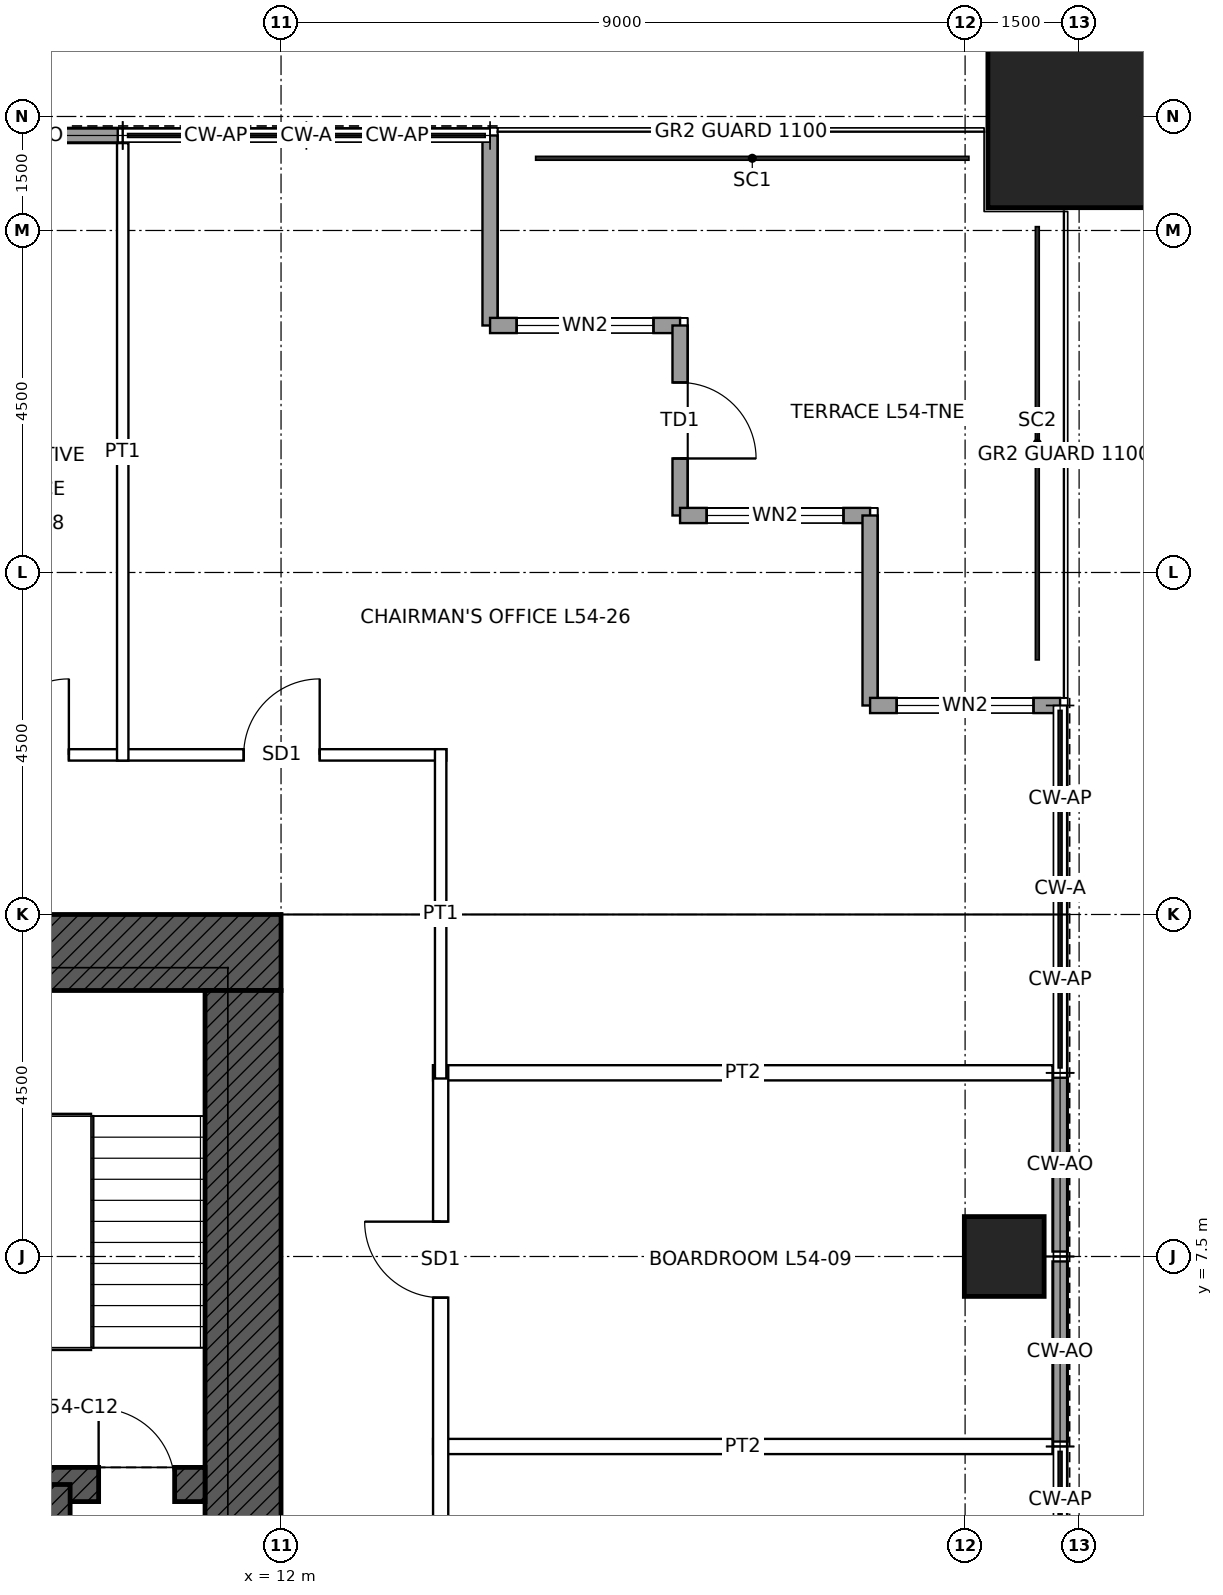
"""IFC4 building model, lengths in metres.
Left out: names, types, materials, properties, quantities, classifications, styles, units other than length and angle.
Written with IfcOpenShell. Run it as: python <this file> out.ifc"""

import sys

from ifc_helpers import new_model, si_unit, direction, frame, frame_2d, origin, origin_2d, place, context, subcontext, project, spatial, rectangle, hollow_rectangle, extrude, element, fill, save


model = new_model("IFC4")
c1 = context("Model", 3, precision=1e-05, world=origin(), true_north=direction((0.0, 1.0)))
c2 = subcontext(c1, "Body", "Model", "MODEL_VIEW")
j1 = project(units=[si_unit("LENGTHUNIT", "METRE"), si_unit("PLANEANGLEUNIT", "RADIAN")], contexts=[c1])
p1 = place(None, origin())
s1 = spatial("IfcSite", under=j1, at=p1, CompositionType="ELEMENT")
p2 = place(p1, origin())
s2 = spatial("IfcBuilding", under=s1, at=p2, CompositionType="ELEMENT")
p3 = place(p2, frame((0.0, 0.0, 249.9)))
s3 = spatial("IfcBuildingStorey", under=s2, at=p3, CompositionType="ELEMENT", Elevation=249.9)
p4 = place(p3, frame((22.5, 22.5, 0.0), z_axis=(0.0, 0.0, 1.0), x_axis=(1.0, 0.0, 0.0)))
e1 = element("IfcColumn", 1, at=p4, inside=s3, PredefinedType="COLUMN", context=c2, shape_type="SweptSolid", body=[
    extrude(hollow_rectangle(XDim=2.4, YDim=2.4, WallThickness=0.12, at=origin_2d()), origin(), (0.0, 0.0, 1.0), 4.0),
])
p5 = place(p3, frame((21.515, 7.5, 0.0), z_axis=(0.0, 0.0, 1.0), x_axis=(1.0, 0.0, 0.0)))
e2 = element("IfcColumn", 2, at=p5, inside=s3, PredefinedType="COLUMN", context=c2, shape_type="SweptSolid", body=[
    extrude(hollow_rectangle(XDim=1.05, YDim=1.05, WallThickness=0.07, at=origin_2d()), origin(), (0.0, 0.0, 1.0), 4.0),
])
p6 = place(p3, frame((-12.0, 11.5, 0.0), z_axis=(0.0, 0.0, 1.0), x_axis=(1.0, 0.0, 0.0)))
e3 = element("IfcWall", 3, at=p6, inside=s3, PredefinedType="SHEAR", context=c2, shape_type="SweptSolid", body=[
    extrude(rectangle(XDim=24.0, YDim=1.0, at=frame_2d((12.0, 0.0))), origin(), (0.0, 0.0, 1.0), 4.0),
])
p7 = place(p6, frame((6.25, 0.0, 0.0)))
e4 = element("IfcOpeningElement", 4, at=p7, cuts=e3, PredefinedType="OPENING", context=c2, shape_type="SweptSolid", body=[
    extrude(rectangle(XDim=1.0, YDim=2.4, at=frame_2d((0.5, 1.2))), frame((0.0, 0.51, 0.0), z_axis=(0.0, -1.0, 0.0), x_axis=(1.0, 0.0, 0.0)), (0.0, 0.0, 1.0), 1.02),
])
p8 = place(p6, frame((16.75, 0.0, 0.0)))
e5 = element("IfcOpeningElement", 5, at=p8, cuts=e3, PredefinedType="OPENING", context=c2, shape_type="SweptSolid", body=[
    extrude(rectangle(XDim=1.0, YDim=2.4, at=frame_2d((0.5, 1.2))), frame((0.0, 0.51, 0.0), z_axis=(0.0, -1.0, 0.0), x_axis=(1.0, 0.0, 0.0)), (0.0, 0.0, 1.0), 1.02),
])
p9 = place(p3, frame((11.5, 11.0, 0.0), z_axis=(0.0, 0.0, 1.0), x_axis=(0.0, -1.0, 0.0)))
e6 = element("IfcWall", 6, at=p9, inside=s3, PredefinedType="SHEAR", context=c2, shape_type="SweptSolid", body=[
    extrude(rectangle(XDim=22.0, YDim=1.0, at=frame_2d((11.0, 0.0))), origin(), (0.0, 0.0, 1.0), 4.0),
])
p10 = place(p9, frame((10.5, 0.0, 0.0)))
e7 = element("IfcOpeningElement", 7, at=p10, cuts=e6, PredefinedType="OPENING", context=c2, shape_type="SweptSolid", body=[
    extrude(rectangle(XDim=1.0, YDim=2.4, at=frame_2d((0.5, 1.2))), frame((0.0, 0.51, 0.0), z_axis=(0.0, -1.0, 0.0), x_axis=(1.0, 0.0, 0.0)), (0.0, 0.0, 1.0), 1.02),
])
p11 = place(p3, frame((-11.0, 4.5, 0.0), z_axis=(0.0, 0.0, 1.0), x_axis=(1.0, 0.0, 0.0)))
e8 = element("IfcWall", 8, at=p11, inside=s3, PredefinedType="SHEAR", context=c2, shape_type="SweptSolid", body=[
    extrude(rectangle(XDim=22.0, YDim=0.45, at=frame_2d((11.0, 0.0))), origin(), (0.0, 0.0, 1.0), 4.0),
])
p12 = place(p11, frame((0.4, 0.0, 0.0)))
e9 = element("IfcOpeningElement", 9, at=p12, cuts=e8, PredefinedType="OPENING", context=c2, shape_type="SweptSolid", body=[
    extrude(rectangle(XDim=1.0, YDim=2.1, at=frame_2d((0.5, 1.05))), frame((0.0, 0.235, 0.0), z_axis=(0.0, -1.0, 0.0), x_axis=(1.0, 0.0, 0.0)), (0.0, 0.0, 1.0), 0.47),
])
p13 = place(p11, frame((20.6, 0.0, 0.0)))
e10 = element("IfcOpeningElement", 10, at=p13, cuts=e8, PredefinedType="OPENING", context=c2, shape_type="SweptSolid", body=[
    extrude(rectangle(XDim=1.0, YDim=2.1, at=frame_2d((0.5, 1.05))), frame((0.0, 0.235, 0.0), z_axis=(0.0, -1.0, 0.0), x_axis=(1.0, 0.0, 0.0)), (0.0, 0.0, 1.0), 0.47),
])
p14 = place(p3, frame((9.0, 1.5, 0.0), z_axis=(0.0, 0.0, 1.0), x_axis=(0.0, 1.0, 0.0)))
e11 = element("IfcWall", 11, at=p14, inside=s3, PredefinedType="SHEAR", context=c2, shape_type="SweptSolid", body=[
    extrude(rectangle(XDim=3.0, YDim=0.45, at=frame_2d((1.5, 0.0))), origin(), (0.0, 0.0, 1.0), 4.0),
])
p15 = place(p3, frame((14.75, 22.25, 0.0), z_axis=(0.0, 0.0, 1.0), x_axis=(0.0, -1.0, 0.0)))
e12 = element("IfcWall", 12, at=p15, inside=s3, PredefinedType="SOLIDWALL", context=c2, shape_type="SweptSolid", body=[
    extrude(rectangle(XDim=2.5, YDim=0.2, at=frame_2d((1.25, 0.0))), origin(), (0.0, 0.0, 1.0), 3.75),
])
p16 = place(p3, frame((14.75, 19.75, 0.0), z_axis=(0.0, 0.0, 1.0), x_axis=(1.0, 0.0, 0.0)))
e13 = element("IfcWall", 13, at=p16, inside=s3, PredefinedType="SOLIDWALL", context=c2, shape_type="SweptSolid", body=[
    extrude(rectangle(XDim=2.5, YDim=0.2, at=frame_2d((1.25, 0.0))), origin(), (0.0, 0.0, 1.0), 3.75),
])
p17 = place(p16, frame((0.35, 0.0, 0.3)))
e14 = element("IfcOpeningElement", 14, at=p17, cuts=e13, PredefinedType="OPENING", context=c2, shape_type="SweptSolid", body=[
    extrude(rectangle(XDim=1.8, YDim=2.4, at=frame_2d((0.9, 1.2))), frame((0.0, 0.11, 0.0), z_axis=(0.0, -1.0, 0.0), x_axis=(1.0, 0.0, 0.0)), (0.0, 0.0, 1.0), 0.22),
])
p18 = place(p3, frame((17.25, 19.75, 0.0), z_axis=(0.0, 0.0, 1.0), x_axis=(0.0, -1.0, 0.0)))
e15 = element("IfcWall", 15, at=p18, inside=s3, PredefinedType="SOLIDWALL", context=c2, shape_type="SweptSolid", body=[
    extrude(rectangle(XDim=2.5, YDim=0.2, at=frame_2d((1.25, 0.0))), origin(), (0.0, 0.0, 1.0), 3.75),
])
p19 = place(p18, frame((0.75, 0.0, 0.0)))
e16 = element("IfcOpeningElement", 16, at=p19, cuts=e15, PredefinedType="OPENING", context=c2, shape_type="SweptSolid", body=[
    extrude(rectangle(XDim=1.0, YDim=2.4, at=frame_2d((0.5, 1.2))), frame((0.0, 0.11, 0.0), z_axis=(0.0, -1.0, 0.0), x_axis=(1.0, 0.0, 0.0)), (0.0, 0.0, 1.0), 0.22),
])
p20 = place(p3, frame((17.25, 17.25, 0.0), z_axis=(0.0, 0.0, 1.0), x_axis=(1.0, 0.0, 0.0)))
e17 = element("IfcWall", 17, at=p20, inside=s3, PredefinedType="SOLIDWALL", context=c2, shape_type="SweptSolid", body=[
    extrude(rectangle(XDim=2.5, YDim=0.2, at=frame_2d((1.25, 0.0))), origin(), (0.0, 0.0, 1.0), 3.75),
])
p21 = place(p20, frame((0.35, 0.0, 0.3)))
e18 = element("IfcOpeningElement", 18, at=p21, cuts=e17, PredefinedType="OPENING", context=c2, shape_type="SweptSolid", body=[
    extrude(rectangle(XDim=1.8, YDim=2.4, at=frame_2d((0.9, 1.2))), frame((0.0, 0.11, 0.0), z_axis=(0.0, -1.0, 0.0), x_axis=(1.0, 0.0, 0.0)), (0.0, 0.0, 1.0), 0.22),
])
p22 = place(p3, frame((19.75, 17.25, 0.0), z_axis=(0.0, 0.0, 1.0), x_axis=(0.0, -1.0, 0.0)))
e19 = element("IfcWall", 19, at=p22, inside=s3, PredefinedType="SOLIDWALL", context=c2, shape_type="SweptSolid", body=[
    extrude(rectangle(XDim=2.5, YDim=0.2, at=frame_2d((1.25, 0.0))), origin(), (0.0, 0.0, 1.0), 3.75),
])
p23 = place(p3, frame((19.75, 14.75, 0.0), z_axis=(0.0, 0.0, 1.0), x_axis=(1.0, 0.0, 0.0)))
e20 = element("IfcWall", 20, at=p23, inside=s3, PredefinedType="SOLIDWALL", context=c2, shape_type="SweptSolid", body=[
    extrude(rectangle(XDim=2.5, YDim=0.2, at=frame_2d((1.25, 0.0))), origin(), (0.0, 0.0, 1.0), 3.75),
])
p24 = place(p23, frame((0.35, 0.0, 0.3)))
e21 = element("IfcOpeningElement", 21, at=p24, cuts=e20, PredefinedType="OPENING", context=c2, shape_type="SweptSolid", body=[
    extrude(rectangle(XDim=1.8, YDim=2.4, at=frame_2d((0.9, 1.2))), frame((0.0, 0.11, 0.0), z_axis=(0.0, -1.0, 0.0), x_axis=(1.0, 0.0, 0.0)), (0.0, 0.0, 1.0), 0.22),
])
for number, where, z_axis, x_axis in (
    (22, (7.565, 22.25, 0.0), (0.0, 0.0, 1.0), (1.0, 0.0, 0.0)),
    (23, (22.25, 9.852, 0.0), (0.0, 0.0, 1.0), (0.0, -1.0, 0.0)),
):
    element("IfcWall", number, at=place(p3, frame(where, z_axis=z_axis, x_axis=x_axis)), inside=s3, PredefinedType="SOLIDWALL", context=c2, shape_type="SweptSolid", body=[
        extrude(rectangle(XDim=2.287, YDim=0.2, at=frame_2d((1.144, 0.0))), origin(), (0.0, 0.0, 1.0), 3.75),
    ])
p25 = place(p3, frame((22.25, 7.435, 0.0), z_axis=(0.0, 0.0, 1.0), x_axis=(0.0, -1.0, 0.0)))
e24 = element("IfcWall", 24, at=p25, inside=s3, PredefinedType="SOLIDWALL", context=c2, shape_type="SweptSolid", body=[
    extrude(rectangle(XDim=2.37, YDim=0.2, at=frame_2d((1.185, 0.0))), origin(), (0.0, 0.0, 1.0), 3.75),
])
for number, where, z_axis, x_axis in (
    (25, (14.0, 5.0, 0.0), (0.0, 0.0, 1.0), (1.0, 0.0, 0.0)),
    (26, (14.0, 9.917, 0.0), (0.0, 0.0, 1.0), (1.0, 0.0, 0.0)),
):
    element("IfcWall", number, at=place(p3, frame(where, z_axis=z_axis, x_axis=x_axis)), inside=s3, PredefinedType="PARTITIONING", context=c2, shape_type="SweptSolid", body=[
        extrude(rectangle(XDim=8.15, YDim=0.2, at=frame_2d((4.075, 0.0))), origin(), (0.0, 0.0, 1.0), 3.75),
    ])
p26 = place(p3, frame((-14.175, 14.1, 0.0), z_axis=(0.0, 0.0, 1.0), x_axis=(1.0, 0.0, 0.0)))
e27 = element("IfcWall", 27, at=p26, inside=s3, PredefinedType="PARTITIONING", context=c2, shape_type="SweptSolid", body=[
    extrude(rectangle(XDim=28.35, YDim=0.15, at=frame_2d((14.175, 0.0))), origin(), (0.0, 0.0, 1.0), 3.75),
])
p27 = place(p26, frame((4.967, 0.0, 0.0)))
e28 = element("IfcOpeningElement", 28, at=p27, cuts=e27, PredefinedType="OPENING", context=c2, shape_type="SweptSolid", body=[
    extrude(rectangle(XDim=1.0, YDim=2.4, at=frame_2d((0.5, 1.2))), frame((0.0, 0.085, 0.0), z_axis=(0.0, -1.0, 0.0), x_axis=(1.0, 0.0, 0.0)), (0.0, 0.0, 1.0), 0.17),
])
p28 = place(p26, frame((7.075, 0.0, 0.0)))
e29 = element("IfcOpeningElement", 29, at=p28, cuts=e27, PredefinedType="OPENING", context=c2, shape_type="SweptSolid", body=[
    extrude(rectangle(XDim=1.0, YDim=2.4, at=frame_2d((0.5, 1.2))), frame((0.0, 0.085, 0.0), z_axis=(0.0, -1.0, 0.0), x_axis=(1.0, 0.0, 0.0)), (0.0, 0.0, 1.0), 0.17),
])
p29 = place(p26, frame((13.675, 0.0, 0.0)))
e30 = element("IfcOpeningElement", 30, at=p29, cuts=e27, PredefinedType="OPENING", context=c2, shape_type="SweptSolid", body=[
    extrude(rectangle(XDim=1.0, YDim=2.4, at=frame_2d((0.5, 1.2))), frame((0.0, 0.085, 0.0), z_axis=(0.0, -1.0, 0.0), x_axis=(1.0, 0.0, 0.0)), (0.0, 0.0, 1.0), 0.17),
])
p30 = place(p26, frame((20.275, 0.0, 0.0)))
e31 = element("IfcOpeningElement", 31, at=p30, cuts=e27, PredefinedType="OPENING", context=c2, shape_type="SweptSolid", body=[
    extrude(rectangle(XDim=1.0, YDim=2.4, at=frame_2d((0.5, 1.2))), frame((0.0, 0.085, 0.0), z_axis=(0.0, -1.0, 0.0), x_axis=(1.0, 0.0, 0.0)), (0.0, 0.0, 1.0), 0.17),
])
p31 = place(p26, frame((22.384, 0.0, 0.0)))
e32 = element("IfcOpeningElement", 32, at=p31, cuts=e27, PredefinedType="OPENING", context=c2, shape_type="SweptSolid", body=[
    extrude(rectangle(XDim=1.0, YDim=2.4, at=frame_2d((0.5, 1.2))), frame((0.0, 0.085, 0.0), z_axis=(0.0, -1.0, 0.0), x_axis=(1.0, 0.0, 0.0)), (0.0, 0.0, 1.0), 0.17),
])
p32 = place(p26, frame((25.684, 0.0, 0.0)))
e33 = element("IfcOpeningElement", 33, at=p32, cuts=e27, PredefinedType="OPENING", context=c2, shape_type="SweptSolid", body=[
    extrude(rectangle(XDim=1.0, YDim=2.4, at=frame_2d((0.5, 1.2))), frame((0.0, 0.085, 0.0), z_axis=(0.0, -1.0, 0.0), x_axis=(1.0, 0.0, 0.0)), (0.0, 0.0, 1.0), 0.17),
])
p33 = place(p26, frame((1.667, 0.0, 0.0)))
e34 = element("IfcOpeningElement", 34, at=p33, cuts=e27, PredefinedType="OPENING", context=c2, shape_type="SweptSolid", body=[
    extrude(rectangle(XDim=1.0, YDim=2.4, at=frame_2d((0.5, 1.2))), frame((0.0, 0.085, 0.0), z_axis=(0.0, -1.0, 0.0), x_axis=(1.0, 0.0, 0.0)), (0.0, 0.0, 1.0), 0.17),
])
p34 = place(p3, frame((9.917, 14.025, 0.0), z_axis=(0.0, 0.0, 1.0), x_axis=(0.0, 1.0, 0.0)))
e35 = element("IfcWall", 35, at=p34, inside=s3, PredefinedType="PARTITIONING", context=c2, shape_type="SweptSolid", body=[
    extrude(rectangle(XDim=8.125, YDim=0.15, at=frame_2d((4.062, 0.0))), origin(), (0.0, 0.0, 1.0), 3.75),
])
p35 = place(p3, frame((14.1, -5.1, 0.0), z_axis=(0.0, 0.0, 1.0), x_axis=(0.0, 1.0, 0.0)))
e36 = element("IfcWall", 36, at=p35, inside=s3, PredefinedType="PARTITIONING", context=c2, shape_type="SweptSolid", body=[
    extrude(rectangle(XDim=15.117, YDim=0.2, at=frame_2d((7.559, 0.0))), origin(), (0.0, 0.0, 1.0), 3.75),
])
p36 = place(p35, frame((12.059, 0.0, 0.0)))
e37 = element("IfcOpeningElement", 37, at=p36, cuts=e36, PredefinedType="OPENING", context=c2, shape_type="SweptSolid", body=[
    extrude(rectangle(XDim=1.0, YDim=2.4, at=frame_2d((0.5, 1.2))), frame((0.0, 0.11, 0.0), z_axis=(0.0, -1.0, 0.0), x_axis=(1.0, 0.0, 0.0)), (0.0, 0.0, 1.0), 0.22),
])
p37 = place(p35, frame((7.1, 0.0, 0.0)))
e38 = element("IfcOpeningElement", 38, at=p37, cuts=e36, PredefinedType="OPENING", context=c2, shape_type="SweptSolid", body=[
    extrude(rectangle(XDim=1.0, YDim=2.4, at=frame_2d((0.5, 1.2))), frame((0.0, 0.11, 0.0), z_axis=(0.0, -1.0, 0.0), x_axis=(1.0, 0.0, 0.0)), (0.0, 0.0, 1.0), 0.22),
])
p38 = place(p35, frame((2.1, 0.0, 0.0)))
e39 = element("IfcOpeningElement", 39, at=p38, cuts=e36, PredefinedType="OPENING", context=c2, shape_type="SweptSolid", body=[
    extrude(rectangle(XDim=1.0, YDim=2.4, at=frame_2d((0.5, 1.2))), frame((0.0, 0.11, 0.0), z_axis=(0.0, -1.0, 0.0), x_axis=(1.0, 0.0, 0.0)), (0.0, 0.0, 1.0), 0.22),
])
p39 = place(p3, frame((14.1, 9.842, 0.0), z_axis=(0.0, 0.0, 1.0), x_axis=(0.0, 1.0, 0.0)))
e40 = element("IfcWall", 40, at=p39, inside=s3, PredefinedType="PARTITIONING", context=c2, shape_type="SweptSolid", body=[
    extrude(rectangle(XDim=4.333, YDim=0.15, at=frame_2d((2.167, 0.0))), origin(), (0.0, 0.0, 1.0), 3.75),
])
p40 = place(p17, origin())
e41 = element("IfcWindow", 41, at=p40, inside=s3, PartitioningType="SINGLE_PANEL", PredefinedType="WINDOW", context=c2, shape_type="SweptSolid", body=[
    extrude(rectangle(XDim=1.8, YDim=2.4, at=frame_2d((0.9, 1.2))), frame((0.0, 0.03, 0.0), z_axis=(0.0, -1.0, 0.0), x_axis=(1.0, 0.0, 0.0)), (0.0, 0.0, 1.0), 0.06),
])
fill(e14, e41)
p41 = place(p19, origin())
e42 = element("IfcDoor", 42, at=p41, inside=s3, OperationType="SINGLE_SWING_RIGHT", PredefinedType="DOOR", context=c2, shape_type="SweptSolid", body=[
    extrude(rectangle(XDim=1.0, YDim=2.4, at=frame_2d((0.5, 1.2))), frame((0.0, 0.025, 0.0), z_axis=(0.0, -1.0, 0.0), x_axis=(1.0, 0.0, 0.0)), (0.0, 0.0, 1.0), 0.05),
])
fill(e16, e42)
p42 = place(p21, origin())
e43 = element("IfcWindow", 43, at=p42, inside=s3, PartitioningType="SINGLE_PANEL", PredefinedType="WINDOW", context=c2, shape_type="SweptSolid", body=[
    extrude(rectangle(XDim=1.8, YDim=2.4, at=frame_2d((0.9, 1.2))), frame((0.0, 0.03, 0.0), z_axis=(0.0, -1.0, 0.0), x_axis=(1.0, 0.0, 0.0)), (0.0, 0.0, 1.0), 0.06),
])
fill(e18, e43)
p43 = place(p24, origin())
e44 = element("IfcWindow", 44, at=p43, inside=s3, PartitioningType="SINGLE_PANEL", PredefinedType="WINDOW", context=c2, shape_type="SweptSolid", body=[
    extrude(rectangle(XDim=1.8, YDim=2.4, at=frame_2d((0.9, 1.2))), frame((0.0, 0.03, 0.0), z_axis=(0.0, -1.0, 0.0), x_axis=(1.0, 0.0, 0.0)), (0.0, 0.0, 1.0), 0.06),
])
fill(e21, e44)
p44 = place(p13, origin())
e45 = element("IfcDoor", 45, at=p44, inside=s3, OperationType="SINGLE_SWING_LEFT", PredefinedType="DOOR", context=c2, shape_type="SweptSolid", body=[
    extrude(rectangle(XDim=1.0, YDim=2.1, at=frame_2d((0.5, 1.05))), frame((0.0, 0.025, 0.0), z_axis=(0.0, -1.0, 0.0), x_axis=(1.0, 0.0, 0.0)), (0.0, 0.0, 1.0), 0.05),
])
fill(e10, e45)
p45 = place(p31, origin())
e46 = element("IfcDoor", 46, at=p45, inside=s3, OperationType="SINGLE_SWING_RIGHT", PredefinedType="DOOR", context=c2, shape_type="SweptSolid", body=[
    extrude(rectangle(XDim=1.0, YDim=2.4, at=frame_2d((0.5, 1.2))), frame((0.0, 0.025, 0.0), z_axis=(0.0, -1.0, 0.0), x_axis=(1.0, 0.0, 0.0)), (0.0, 0.0, 1.0), 0.05),
])
fill(e32, e46)
p46 = place(p36, origin())
e47 = element("IfcDoor", 47, at=p46, inside=s3, OperationType="SINGLE_SWING_RIGHT", PredefinedType="DOOR", context=c2, shape_type="SweptSolid", body=[
    extrude(rectangle(XDim=1.0, YDim=2.4, at=frame_2d((0.5, 1.2))), frame((0.0, 0.025, 0.0), z_axis=(0.0, -1.0, 0.0), x_axis=(1.0, 0.0, 0.0)), (0.0, 0.0, 1.0), 0.05),
])
fill(e37, e47)
p47 = place(p32, origin())
e48 = element("IfcDoor", 48, at=p47, inside=s3, OperationType="SINGLE_SWING_RIGHT", PredefinedType="DOOR", context=c2, shape_type="SweptSolid", body=[
    extrude(rectangle(XDim=1.0, YDim=2.4, at=frame_2d((0.5, 1.2))), frame((0.0, 0.025, 0.0), z_axis=(0.0, -1.0, 0.0), x_axis=(1.0, 0.0, 0.0)), (0.0, 0.0, 1.0), 0.05),
])
fill(e33, e48)
save(model, sys.argv[1])
